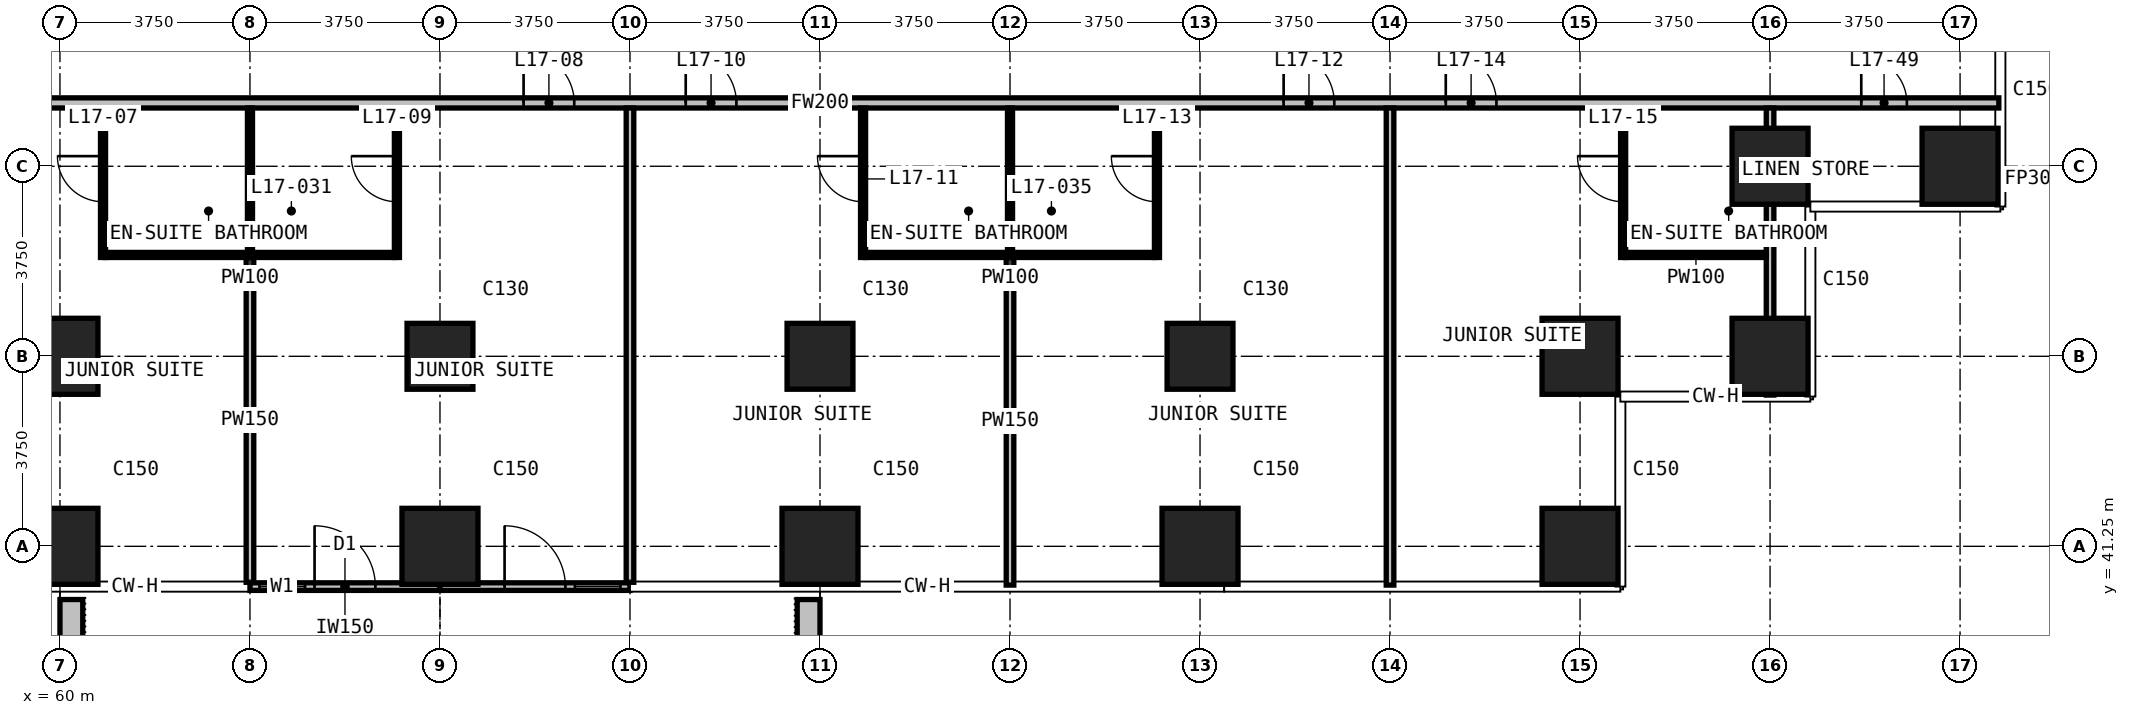
"""IFC4 building model, lengths in metres.
Left out: names, types, materials, properties, quantities, classifications, styles, units other than length and angle.
Written with IfcOpenShell. Run it as: python <this file> out.ifc"""

import sys

from ifc_helpers import new_model, si_unit, direction, frame, frame_2d, origin, origin_2d, place, context, subcontext, project, spatial, rectangle, extrude, element, fill, save


model = new_model("IFC4")
c1 = context("Model", 3, precision=1e-05, world=origin(), true_north=direction((0.0, 1.0)))
c2 = subcontext(c1, "Body", "Model", "MODEL_VIEW")
j1 = project(units=[si_unit("LENGTHUNIT", "METRE"), si_unit("PLANEANGLEUNIT", "RADIAN")], contexts=[c1])
p1 = place(None, origin())
s1 = spatial("IfcSite", under=j1, at=p1, CompositionType="ELEMENT")
p2 = place(p1, origin())
s2 = spatial("IfcBuilding", under=s1, at=p2, CompositionType="ELEMENT")
p3 = place(p2, frame((0.0, 0.0, 75.8)))
s3 = spatial("IfcBuildingStorey", under=s2, at=p3, CompositionType="ELEMENT", Elevation=75.8)
for number, where, z_axis, x_axis in (
    (1, (60.0, 41.25, 0.0), (0.0, 0.0, 1.0), (1.0, 0.0, 0.0)),
    (2, (60.0, 45.0, 0.0), (0.0, 0.0, 1.0), (1.0, 0.0, 0.0)),
    (3, (67.5, 41.25, 0.0), (0.0, 0.0, 1.0), (1.0, 0.0, 0.0)),
):
    element("IfcColumn", number, at=place(p3, frame(where, z_axis=z_axis, x_axis=x_axis)), inside=s3, PredefinedType="COLUMN", context=c2, shape_type="SweptSolid", body=[
        extrude(rectangle(XDim=1.5, YDim=1.5, at=origin_2d()), origin(), (0.0, 0.0, 1.0), 3.3),
    ])
p4 = place(p3, frame((67.5, 45.0, 0.0), z_axis=(0.0, 0.0, 1.0), x_axis=(1.0, 0.0, 0.0)))
e4 = element("IfcColumn", 4, at=p4, inside=s3, PredefinedType="COLUMN", context=c2, shape_type="SweptSolid", body=[
    extrude(rectangle(XDim=1.3, YDim=1.3, at=origin_2d()), origin(), (0.0, 0.0, 1.0), 3.3),
])
p5 = place(p3, frame((75.0, 41.25, 0.0), z_axis=(0.0, 0.0, 1.0), x_axis=(1.0, 0.0, 0.0)))
e5 = element("IfcColumn", 5, at=p5, inside=s3, PredefinedType="COLUMN", context=c2, shape_type="SweptSolid", body=[
    extrude(rectangle(XDim=1.5, YDim=1.5, at=origin_2d()), origin(), (0.0, 0.0, 1.0), 3.3),
])
p6 = place(p3, frame((75.0, 45.0, 0.0), z_axis=(0.0, 0.0, 1.0), x_axis=(1.0, 0.0, 0.0)))
e6 = element("IfcColumn", 6, at=p6, inside=s3, PredefinedType="COLUMN", context=c2, shape_type="SweptSolid", body=[
    extrude(rectangle(XDim=1.3, YDim=1.3, at=origin_2d()), origin(), (0.0, 0.0, 1.0), 3.3),
])
p7 = place(p3, frame((82.5, 41.25, 0.0), z_axis=(0.0, 0.0, 1.0), x_axis=(1.0, 0.0, 0.0)))
e7 = element("IfcColumn", 7, at=p7, inside=s3, PredefinedType="COLUMN", context=c2, shape_type="SweptSolid", body=[
    extrude(rectangle(XDim=1.5, YDim=1.5, at=origin_2d()), origin(), (0.0, 0.0, 1.0), 3.3),
])
p8 = place(p3, frame((82.5, 45.0, 0.0), z_axis=(0.0, 0.0, 1.0), x_axis=(1.0, 0.0, 0.0)))
e8 = element("IfcColumn", 8, at=p8, inside=s3, PredefinedType="COLUMN", context=c2, shape_type="SweptSolid", body=[
    extrude(rectangle(XDim=1.3, YDim=1.3, at=origin_2d()), origin(), (0.0, 0.0, 1.0), 3.3),
])
for number, where, z_axis, x_axis in (
    (9, (90.0, 41.25, 0.0), (0.0, 0.0, 1.0), (1.0, 0.0, 0.0)),
    (10, (90.0, 45.0, 0.0), (0.0, 0.0, 1.0), (1.0, 0.0, 0.0)),
    (11, (93.75, 45.0, 0.0), (0.0, 0.0, 1.0), (1.0, 0.0, 0.0)),
    (12, (93.75, 48.75, 0.0), (0.0, 0.0, 1.0), (1.0, 0.0, 0.0)),
    (13, (97.5, 48.75, 0.0), (0.0, 0.0, 1.0), (1.0, 0.0, 0.0)),
):
    element("IfcColumn", number, at=place(p3, frame(where, z_axis=z_axis, x_axis=x_axis)), inside=s3, PredefinedType="COLUMN", context=c2, shape_type="SweptSolid", body=[
        extrude(rectangle(XDim=1.5, YDim=1.5, at=origin_2d()), origin(), (0.0, 0.0, 1.0), 3.3),
    ])
p9 = place(p3, frame((63.75, 40.455, 0.0), z_axis=(0.0, 0.0, 1.0), x_axis=(1.0, 0.0, 0.0)))
e14 = element("IfcWall", 14, at=p9, inside=s3, PredefinedType="SOLIDWALL", context=c2, shape_type="SweptSolid", body=[
    extrude(rectangle(XDim=3.75, YDim=0.15, at=frame_2d((1.875, 0.0))), origin(), (0.0, 0.0, 1.0), 3.0),
])
p10 = place(p9, frame((0.188, 0.0, 0.1)))
e15 = element("IfcOpeningElement", 15, at=p10, cuts=e14, PredefinedType="OPENING", context=c2, shape_type="SweptSolid", body=[
    extrude(rectangle(XDim=0.9, YDim=2.4, at=frame_2d((0.45, 1.2))), frame((0.0, 0.085, 0.0), z_axis=(0.0, -1.0, 0.0), x_axis=(1.0, 0.0, 0.0)), (0.0, 0.0, 1.0), 0.17),
])
p11 = place(p9, frame((1.275, 0.0, 0.0)))
e16 = element("IfcOpeningElement", 16, at=p11, cuts=e14, PredefinedType="OPENING", context=c2, shape_type="SweptSolid", body=[
    extrude(rectangle(XDim=1.2, YDim=2.4, at=frame_2d((0.6, 1.2))), frame((0.0, 0.085, 0.0), z_axis=(0.0, -1.0, 0.0), x_axis=(1.0, 0.0, 0.0)), (0.0, 0.0, 1.0), 0.17),
])
p12 = place(p3, frame((67.5, 40.455, 0.0), z_axis=(0.0, 0.0, 1.0), x_axis=(1.0, 0.0, 0.0)))
e17 = element("IfcWall", 17, at=p12, inside=s3, PredefinedType="SOLIDWALL", context=c2, shape_type="SweptSolid", body=[
    extrude(rectangle(XDim=3.75, YDim=0.15, at=frame_2d((1.875, 0.0))), origin(), (0.0, 0.0, 1.0), 3.0),
])
p13 = place(p12, frame((1.275, 0.0, 0.0)))
e18 = element("IfcOpeningElement", 18, at=p13, cuts=e17, PredefinedType="OPENING", context=c2, shape_type="SweptSolid", body=[
    extrude(rectangle(XDim=1.2, YDim=2.4, at=frame_2d((0.6, 1.2))), frame((0.0, 0.085, 0.0), z_axis=(0.0, -1.0, 0.0), x_axis=(1.0, 0.0, 0.0)), (0.0, 0.0, 1.0), 0.17),
])
p14 = place(p12, frame((2.663, 0.0, 0.1)))
e19 = element("IfcOpeningElement", 19, at=p14, cuts=e17, PredefinedType="OPENING", context=c2, shape_type="SweptSolid", body=[
    extrude(rectangle(XDim=0.9, YDim=2.4, at=frame_2d((0.45, 1.2))), frame((0.0, 0.085, 0.0), z_axis=(0.0, -1.0, 0.0), x_axis=(1.0, 0.0, 0.0)), (0.0, 0.0, 1.0), 0.17),
])
for number, where, z_axis, x_axis in (
    (20, (60.225, 40.2, 0.0), (0.0, 0.0, 1.0), (0.0, -1.0, 0.0)),
    (21, (74.775, 40.2, 0.0), (0.0, 0.0, 1.0), (0.0, -1.0, 0.0)),
):
    element("IfcWall", number, at=place(p3, frame(where, z_axis=z_axis, x_axis=x_axis)), inside=s3, PredefinedType="USERDEFINED", context=c2, shape_type="SweptSolid", body=[
        extrude(rectangle(XDim=2.35, YDim=0.45, at=frame_2d((1.175, 0.0))), origin(), (0.0, 0.0, 1.0), 1.1),
    ])
p15 = place(p3, frame((51.735, 50.0, 0.0), z_axis=(0.0, 0.0, 1.0), x_axis=(1.0, 0.0, 0.0)))
e22 = element("IfcWall", 22, at=p15, inside=s3, PredefinedType="PARTITIONING", context=c2, shape_type="SweptSolid", body=[
    extrude(rectangle(XDim=46.53, YDim=0.2, at=frame_2d((23.265, 0.0))), origin(), (0.0, 0.0, 1.0), 3.0),
])
p16 = place(p15, frame((5.615, 0.0, 0.0)))
e23 = element("IfcOpeningElement", 23, at=p16, cuts=e22, PredefinedType="OPENING", context=c2, shape_type="SweptSolid", body=[
    extrude(rectangle(XDim=1.0, YDim=2.2, at=frame_2d((0.5, 1.1))), frame((0.0, 0.11, 0.0), z_axis=(0.0, -1.0, 0.0), x_axis=(1.0, 0.0, 0.0)), (0.0, 0.0, 1.0), 0.22),
])
p17 = place(p15, frame((17.415, 0.0, 0.0)))
e24 = element("IfcOpeningElement", 24, at=p17, cuts=e22, PredefinedType="OPENING", context=c2, shape_type="SweptSolid", body=[
    extrude(rectangle(XDim=1.0, YDim=2.2, at=frame_2d((0.5, 1.1))), frame((0.0, 0.11, 0.0), z_axis=(0.0, -1.0, 0.0), x_axis=(1.0, 0.0, 0.0)), (0.0, 0.0, 1.0), 0.22),
])
p18 = place(p15, frame((20.615, 0.0, 0.0)))
e25 = element("IfcOpeningElement", 25, at=p18, cuts=e22, PredefinedType="OPENING", context=c2, shape_type="SweptSolid", body=[
    extrude(rectangle(XDim=1.0, YDim=2.2, at=frame_2d((0.5, 1.1))), frame((0.0, 0.11, 0.0), z_axis=(0.0, -1.0, 0.0), x_axis=(1.0, 0.0, 0.0)), (0.0, 0.0, 1.0), 0.22),
])
p19 = place(p15, frame((32.415, 0.0, 0.0)))
e26 = element("IfcOpeningElement", 26, at=p19, cuts=e22, PredefinedType="OPENING", context=c2, shape_type="SweptSolid", body=[
    extrude(rectangle(XDim=1.0, YDim=2.2, at=frame_2d((0.5, 1.1))), frame((0.0, 0.11, 0.0), z_axis=(0.0, -1.0, 0.0), x_axis=(1.0, 0.0, 0.0)), (0.0, 0.0, 1.0), 0.22),
])
p20 = place(p15, frame((35.615, 0.0, 0.0)))
e27 = element("IfcOpeningElement", 27, at=p20, cuts=e22, PredefinedType="OPENING", context=c2, shape_type="SweptSolid", body=[
    extrude(rectangle(XDim=1.0, YDim=2.2, at=frame_2d((0.5, 1.1))), frame((0.0, 0.11, 0.0), z_axis=(0.0, -1.0, 0.0), x_axis=(1.0, 0.0, 0.0)), (0.0, 0.0, 1.0), 0.22),
])
p21 = place(p15, frame((1.8, 0.0, 0.0)))
e28 = element("IfcOpeningElement", 28, at=p21, cuts=e22, PredefinedType="OPENING", context=c2, shape_type="SweptSolid", body=[
    extrude(rectangle(XDim=0.9, YDim=2.2, at=frame_2d((0.45, 1.1))), frame((0.0, 0.11, 0.0), z_axis=(0.0, -1.0, 0.0), x_axis=(1.0, 0.0, 0.0)), (0.0, 0.0, 1.0), 0.22),
])
p22 = place(p15, frame((43.815, 0.0, 0.0)))
e29 = element("IfcOpeningElement", 29, at=p22, cuts=e22, PredefinedType="OPENING", context=c2, shape_type="SweptSolid", body=[
    extrude(rectangle(XDim=0.9, YDim=2.2, at=frame_2d((0.45, 1.1))), frame((0.0, 0.11, 0.0), z_axis=(0.0, -1.0, 0.0), x_axis=(1.0, 0.0, 0.0)), (0.0, 0.0, 1.0), 0.22),
])
p23 = place(p3, frame((63.75, 40.54, 0.0), z_axis=(0.0, 0.0, 1.0), x_axis=(0.0, 1.0, 0.0)))
e30 = element("IfcWall", 30, at=p23, inside=s3, PredefinedType="PARTITIONING", context=c2, shape_type="SweptSolid", body=[
    extrude(rectangle(XDim=6.41, YDim=0.15, at=frame_2d((3.205, 0.0))), origin(), (0.0, 0.0, 1.0), 3.0),
])
p24 = place(p3, frame((71.25, 40.54, 0.0), z_axis=(0.0, 0.0, 1.0), x_axis=(0.0, 1.0, 0.0)))
e31 = element("IfcWall", 31, at=p24, inside=s3, PredefinedType="PARTITIONING", context=c2, shape_type="SweptSolid", body=[
    extrude(rectangle(XDim=9.36, YDim=0.15, at=frame_2d((4.68, 0.0))), origin(), (0.0, 0.0, 1.0), 3.0),
])
p25 = place(p3, frame((78.75, 40.485, 0.0), z_axis=(0.0, 0.0, 1.0), x_axis=(0.0, 1.0, 0.0)))
e32 = element("IfcWall", 32, at=p25, inside=s3, PredefinedType="PARTITIONING", context=c2, shape_type="SweptSolid", body=[
    extrude(rectangle(XDim=6.465, YDim=0.15, at=frame_2d((3.232, 0.0))), origin(), (0.0, 0.0, 1.0), 3.0),
])
p26 = place(p3, frame((86.25, 40.485, 0.0), z_axis=(0.0, 0.0, 1.0), x_axis=(0.0, 1.0, 0.0)))
e33 = element("IfcWall", 33, at=p26, inside=s3, PredefinedType="PARTITIONING", context=c2, shape_type="SweptSolid", body=[
    extrude(rectangle(XDim=9.415, YDim=0.15, at=frame_2d((4.708, 0.0))), origin(), (0.0, 0.0, 1.0), 3.0),
])
p27 = place(p3, frame((93.75, 44.235, 0.0), z_axis=(0.0, 0.0, 1.0), x_axis=(0.0, 1.0, 0.0)))
e34 = element("IfcWall", 34, at=p27, inside=s3, PredefinedType="PARTITIONING", context=c2, shape_type="SweptSolid", body=[
    extrude(rectangle(XDim=5.665, YDim=0.15, at=frame_2d((2.833, 0.0))), origin(), (0.0, 0.0, 1.0), 3.0),
])
for number, where, z_axis, x_axis in (
    (35, (60.9, 47.0, 0.0), (0.0, 0.0, 1.0), (1.0, 0.0, 0.0)),
    (36, (75.9, 47.0, 0.0), (0.0, 0.0, 1.0), (1.0, 0.0, 0.0)),
):
    element("IfcWall", number, at=place(p3, frame(where, z_axis=z_axis, x_axis=x_axis)), inside=s3, PredefinedType="PARTITIONING", context=c2, shape_type="SweptSolid", body=[
        extrude(rectangle(XDim=5.7, YDim=0.1, at=frame_2d((2.85, 0.0))), origin(), (0.0, 0.0, 1.0), 3.0),
    ])
p28 = place(p3, frame((90.9, 47.0, 0.0), z_axis=(0.0, 0.0, 1.0), x_axis=(1.0, 0.0, 0.0)))
e37 = element("IfcWall", 37, at=p28, inside=s3, PredefinedType="PARTITIONING", context=c2, shape_type="SweptSolid", body=[
    extrude(rectangle(XDim=2.775, YDim=0.1, at=frame_2d((1.388, 0.0))), origin(), (0.0, 0.0, 1.0), 3.0),
])
p29 = place(p3, frame((60.85, 46.95, 0.0), z_axis=(0.0, 0.0, 1.0), x_axis=(0.0, 1.0, 0.0)))
e38 = element("IfcWall", 38, at=p29, inside=s3, PredefinedType="PARTITIONING", context=c2, shape_type="SweptSolid", body=[
    extrude(rectangle(XDim=2.95, YDim=0.1, at=frame_2d((1.475, 0.0))), origin(), (0.0, 0.0, 1.0), 3.0),
])
p30 = place(p29, frame((1.1, 0.0, 0.0)))
e39 = element("IfcOpeningElement", 39, at=p30, cuts=e38, PredefinedType="OPENING", context=c2, shape_type="SweptSolid", body=[
    extrude(rectangle(XDim=0.9, YDim=2.2, at=frame_2d((0.45, 1.1))), frame((0.0, 0.06, 0.0), z_axis=(0.0, -1.0, 0.0), x_axis=(1.0, 0.0, 0.0)), (0.0, 0.0, 1.0), 0.12),
])
p31 = place(p3, frame((63.75, 47.05, 0.0), z_axis=(0.0, 0.0, 1.0), x_axis=(0.0, 1.0, 0.0)))
e40 = element("IfcWall", 40, at=p31, inside=s3, PredefinedType="PARTITIONING", context=c2, shape_type="SweptSolid", body=[
    extrude(rectangle(XDim=2.85, YDim=0.1, at=frame_2d((1.425, 0.0))), origin(), (0.0, 0.0, 1.0), 3.0),
])
p32 = place(p3, frame((66.65, 46.95, 0.0), z_axis=(0.0, 0.0, 1.0), x_axis=(0.0, 1.0, 0.0)))
e41 = element("IfcWall", 41, at=p32, inside=s3, PredefinedType="PARTITIONING", context=c2, shape_type="SweptSolid", body=[
    extrude(rectangle(XDim=2.95, YDim=0.1, at=frame_2d((1.475, 0.0))), origin(), (0.0, 0.0, 1.0), 3.0),
])
p33 = place(p32, frame((1.1, 0.0, 0.0)))
e42 = element("IfcOpeningElement", 42, at=p33, cuts=e41, PredefinedType="OPENING", context=c2, shape_type="SweptSolid", body=[
    extrude(rectangle(XDim=0.9, YDim=2.2, at=frame_2d((0.45, 1.1))), frame((0.0, 0.06, 0.0), z_axis=(0.0, -1.0, 0.0), x_axis=(1.0, 0.0, 0.0)), (0.0, 0.0, 1.0), 0.12),
])
p34 = place(p3, frame((75.85, 46.95, 0.0), z_axis=(0.0, 0.0, 1.0), x_axis=(0.0, 1.0, 0.0)))
e43 = element("IfcWall", 43, at=p34, inside=s3, PredefinedType="PARTITIONING", context=c2, shape_type="SweptSolid", body=[
    extrude(rectangle(XDim=2.95, YDim=0.1, at=frame_2d((1.475, 0.0))), origin(), (0.0, 0.0, 1.0), 3.0),
])
p35 = place(p34, frame((1.1, 0.0, 0.0)))
e44 = element("IfcOpeningElement", 44, at=p35, cuts=e43, PredefinedType="OPENING", context=c2, shape_type="SweptSolid", body=[
    extrude(rectangle(XDim=0.9, YDim=2.2, at=frame_2d((0.45, 1.1))), frame((0.0, 0.06, 0.0), z_axis=(0.0, -1.0, 0.0), x_axis=(1.0, 0.0, 0.0)), (0.0, 0.0, 1.0), 0.12),
])
p36 = place(p3, frame((78.75, 47.05, 0.0), z_axis=(0.0, 0.0, 1.0), x_axis=(0.0, 1.0, 0.0)))
e45 = element("IfcWall", 45, at=p36, inside=s3, PredefinedType="PARTITIONING", context=c2, shape_type="SweptSolid", body=[
    extrude(rectangle(XDim=2.85, YDim=0.1, at=frame_2d((1.425, 0.0))), origin(), (0.0, 0.0, 1.0), 3.0),
])
p37 = place(p3, frame((81.65, 46.95, 0.0), z_axis=(0.0, 0.0, 1.0), x_axis=(0.0, 1.0, 0.0)))
e46 = element("IfcWall", 46, at=p37, inside=s3, PredefinedType="PARTITIONING", context=c2, shape_type="SweptSolid", body=[
    extrude(rectangle(XDim=2.95, YDim=0.1, at=frame_2d((1.475, 0.0))), origin(), (0.0, 0.0, 1.0), 3.0),
])
p38 = place(p37, frame((1.1, 0.0, 0.0)))
e47 = element("IfcOpeningElement", 47, at=p38, cuts=e46, PredefinedType="OPENING", context=c2, shape_type="SweptSolid", body=[
    extrude(rectangle(XDim=0.9, YDim=2.2, at=frame_2d((0.45, 1.1))), frame((0.0, 0.06, 0.0), z_axis=(0.0, -1.0, 0.0), x_axis=(1.0, 0.0, 0.0)), (0.0, 0.0, 1.0), 0.12),
])
p39 = place(p3, frame((90.85, 46.95, 0.0), z_axis=(0.0, 0.0, 1.0), x_axis=(0.0, 1.0, 0.0)))
e48 = element("IfcWall", 48, at=p39, inside=s3, PredefinedType="PARTITIONING", context=c2, shape_type="SweptSolid", body=[
    extrude(rectangle(XDim=2.95, YDim=0.1, at=frame_2d((1.475, 0.0))), origin(), (0.0, 0.0, 1.0), 3.0),
])
p40 = place(p39, frame((1.1, 0.0, 0.0)))
e49 = element("IfcOpeningElement", 49, at=p40, cuts=e48, PredefinedType="OPENING", context=c2, shape_type="SweptSolid", body=[
    extrude(rectangle(XDim=0.9, YDim=2.2, at=frame_2d((0.45, 1.1))), frame((0.0, 0.06, 0.0), z_axis=(0.0, -1.0, 0.0), x_axis=(1.0, 0.0, 0.0)), (0.0, 0.0, 1.0), 0.12),
])
p41 = place(p10, origin())
e50 = element("IfcWindow", 50, at=p41, inside=s3, PartitioningType="SINGLE_PANEL", PredefinedType="WINDOW", context=c2, shape_type="SweptSolid", body=[
    extrude(rectangle(XDim=0.9, YDim=2.4, at=frame_2d((0.45, 1.2))), frame((0.0, 0.03, 0.0), z_axis=(0.0, -1.0, 0.0), x_axis=(1.0, 0.0, 0.0)), (0.0, 0.0, 1.0), 0.06),
])
fill(e15, e50)
p42 = place(p11, origin())
e51 = element("IfcDoor", 51, at=p42, inside=s3, OperationType="SINGLE_SWING_LEFT", PredefinedType="DOOR", context=c2, shape_type="SweptSolid", body=[
    extrude(rectangle(XDim=1.2, YDim=2.4, at=frame_2d((0.6, 1.2))), frame((0.0, 0.025, 0.0), z_axis=(0.0, -1.0, 0.0), x_axis=(1.0, 0.0, 0.0)), (0.0, 0.0, 1.0), 0.05),
])
fill(e16, e51)
p43 = place(p13, origin())
e52 = element("IfcDoor", 52, at=p43, inside=s3, OperationType="SINGLE_SWING_LEFT", PredefinedType="DOOR", context=c2, shape_type="SweptSolid", body=[
    extrude(rectangle(XDim=1.2, YDim=2.4, at=frame_2d((0.6, 1.2))), frame((0.0, 0.025, 0.0), z_axis=(0.0, -1.0, 0.0), x_axis=(1.0, 0.0, 0.0)), (0.0, 0.0, 1.0), 0.05),
])
fill(e18, e52)
p44 = place(p14, origin())
e53 = element("IfcWindow", 53, at=p44, inside=s3, PartitioningType="SINGLE_PANEL", PredefinedType="WINDOW", context=c2, shape_type="SweptSolid", body=[
    extrude(rectangle(XDim=0.9, YDim=2.4, at=frame_2d((0.45, 1.2))), frame((0.0, 0.03, 0.0), z_axis=(0.0, -1.0, 0.0), x_axis=(1.0, 0.0, 0.0)), (0.0, 0.0, 1.0), 0.06),
])
fill(e19, e53)
p45 = place(p30, origin())
e54 = element("IfcDoor", 54, at=p45, inside=s3, OperationType="SINGLE_SWING_RIGHT", PredefinedType="DOOR", context=c2, shape_type="SweptSolid", body=[
    extrude(rectangle(XDim=0.9, YDim=2.2, at=frame_2d((0.45, 1.1))), frame((0.0, 0.025, 0.0), z_axis=(0.0, -1.0, 0.0), x_axis=(1.0, 0.0, 0.0)), (0.0, 0.0, 1.0), 0.05),
])
fill(e39, e54)
p46 = place(p17, origin())
e55 = element("IfcDoor", 55, at=p46, inside=s3, OperationType="SINGLE_SWING_LEFT", PredefinedType="DOOR", context=c2, shape_type="SweptSolid", body=[
    extrude(rectangle(XDim=1.0, YDim=2.2, at=frame_2d((0.5, 1.1))), frame((0.0, 0.025, 0.0), z_axis=(0.0, -1.0, 0.0), x_axis=(1.0, 0.0, 0.0)), (0.0, 0.0, 1.0), 0.05),
])
fill(e24, e55)
p47 = place(p33, origin())
e56 = element("IfcDoor", 56, at=p47, inside=s3, OperationType="SINGLE_SWING_RIGHT", PredefinedType="DOOR", context=c2, shape_type="SweptSolid", body=[
    extrude(rectangle(XDim=0.9, YDim=2.2, at=frame_2d((0.45, 1.1))), frame((0.0, 0.025, 0.0), z_axis=(0.0, -1.0, 0.0), x_axis=(1.0, 0.0, 0.0)), (0.0, 0.0, 1.0), 0.05),
])
fill(e42, e56)
p48 = place(p18, origin())
e57 = element("IfcDoor", 57, at=p48, inside=s3, OperationType="SINGLE_SWING_LEFT", PredefinedType="DOOR", context=c2, shape_type="SweptSolid", body=[
    extrude(rectangle(XDim=1.0, YDim=2.2, at=frame_2d((0.5, 1.1))), frame((0.0, 0.025, 0.0), z_axis=(0.0, -1.0, 0.0), x_axis=(1.0, 0.0, 0.0)), (0.0, 0.0, 1.0), 0.05),
])
fill(e25, e57)
p49 = place(p35, origin())
e58 = element("IfcDoor", 58, at=p49, inside=s3, OperationType="SINGLE_SWING_RIGHT", PredefinedType="DOOR", context=c2, shape_type="SweptSolid", body=[
    extrude(rectangle(XDim=0.9, YDim=2.2, at=frame_2d((0.45, 1.1))), frame((0.0, 0.025, 0.0), z_axis=(0.0, -1.0, 0.0), x_axis=(1.0, 0.0, 0.0)), (0.0, 0.0, 1.0), 0.05),
])
fill(e44, e58)
p50 = place(p19, origin())
e59 = element("IfcDoor", 59, at=p50, inside=s3, OperationType="SINGLE_SWING_RIGHT", PredefinedType="DOOR", context=c2, shape_type="SweptSolid", body=[
    extrude(rectangle(XDim=1.0, YDim=2.2, at=frame_2d((0.5, 1.1))), frame((0.0, 0.025, 0.0), z_axis=(0.0, -1.0, 0.0), x_axis=(1.0, 0.0, 0.0)), (0.0, 0.0, 1.0), 0.05),
])
fill(e26, e59)
p51 = place(p38, origin())
e60 = element("IfcDoor", 60, at=p51, inside=s3, OperationType="SINGLE_SWING_RIGHT", PredefinedType="DOOR", context=c2, shape_type="SweptSolid", body=[
    extrude(rectangle(XDim=0.9, YDim=2.2, at=frame_2d((0.45, 1.1))), frame((0.0, 0.025, 0.0), z_axis=(0.0, -1.0, 0.0), x_axis=(1.0, 0.0, 0.0)), (0.0, 0.0, 1.0), 0.05),
])
fill(e47, e60)
p52 = place(p20, origin())
e61 = element("IfcDoor", 61, at=p52, inside=s3, OperationType="SINGLE_SWING_LEFT", PredefinedType="DOOR", context=c2, shape_type="SweptSolid", body=[
    extrude(rectangle(XDim=1.0, YDim=2.2, at=frame_2d((0.5, 1.1))), frame((0.0, 0.025, 0.0), z_axis=(0.0, -1.0, 0.0), x_axis=(1.0, 0.0, 0.0)), (0.0, 0.0, 1.0), 0.05),
])
fill(e27, e61)
p53 = place(p40, origin())
e62 = element("IfcDoor", 62, at=p53, inside=s3, OperationType="SINGLE_SWING_RIGHT", PredefinedType="DOOR", context=c2, shape_type="SweptSolid", body=[
    extrude(rectangle(XDim=0.9, YDim=2.2, at=frame_2d((0.45, 1.1))), frame((0.0, 0.025, 0.0), z_axis=(0.0, -1.0, 0.0), x_axis=(1.0, 0.0, 0.0)), (0.0, 0.0, 1.0), 0.05),
])
fill(e49, e62)
p54 = place(p22, origin())
e63 = element("IfcDoor", 63, at=p54, inside=s3, OperationType="SINGLE_SWING_LEFT", PredefinedType="DOOR", context=c2, shape_type="SweptSolid", body=[
    extrude(rectangle(XDim=0.9, YDim=2.2, at=frame_2d((0.45, 1.1))), frame((0.0, 0.025, 0.0), z_axis=(0.0, -1.0, 0.0), x_axis=(1.0, 0.0, 0.0)), (0.0, 0.0, 1.0), 0.05),
])
fill(e29, e63)
save(model, sys.argv[1])
